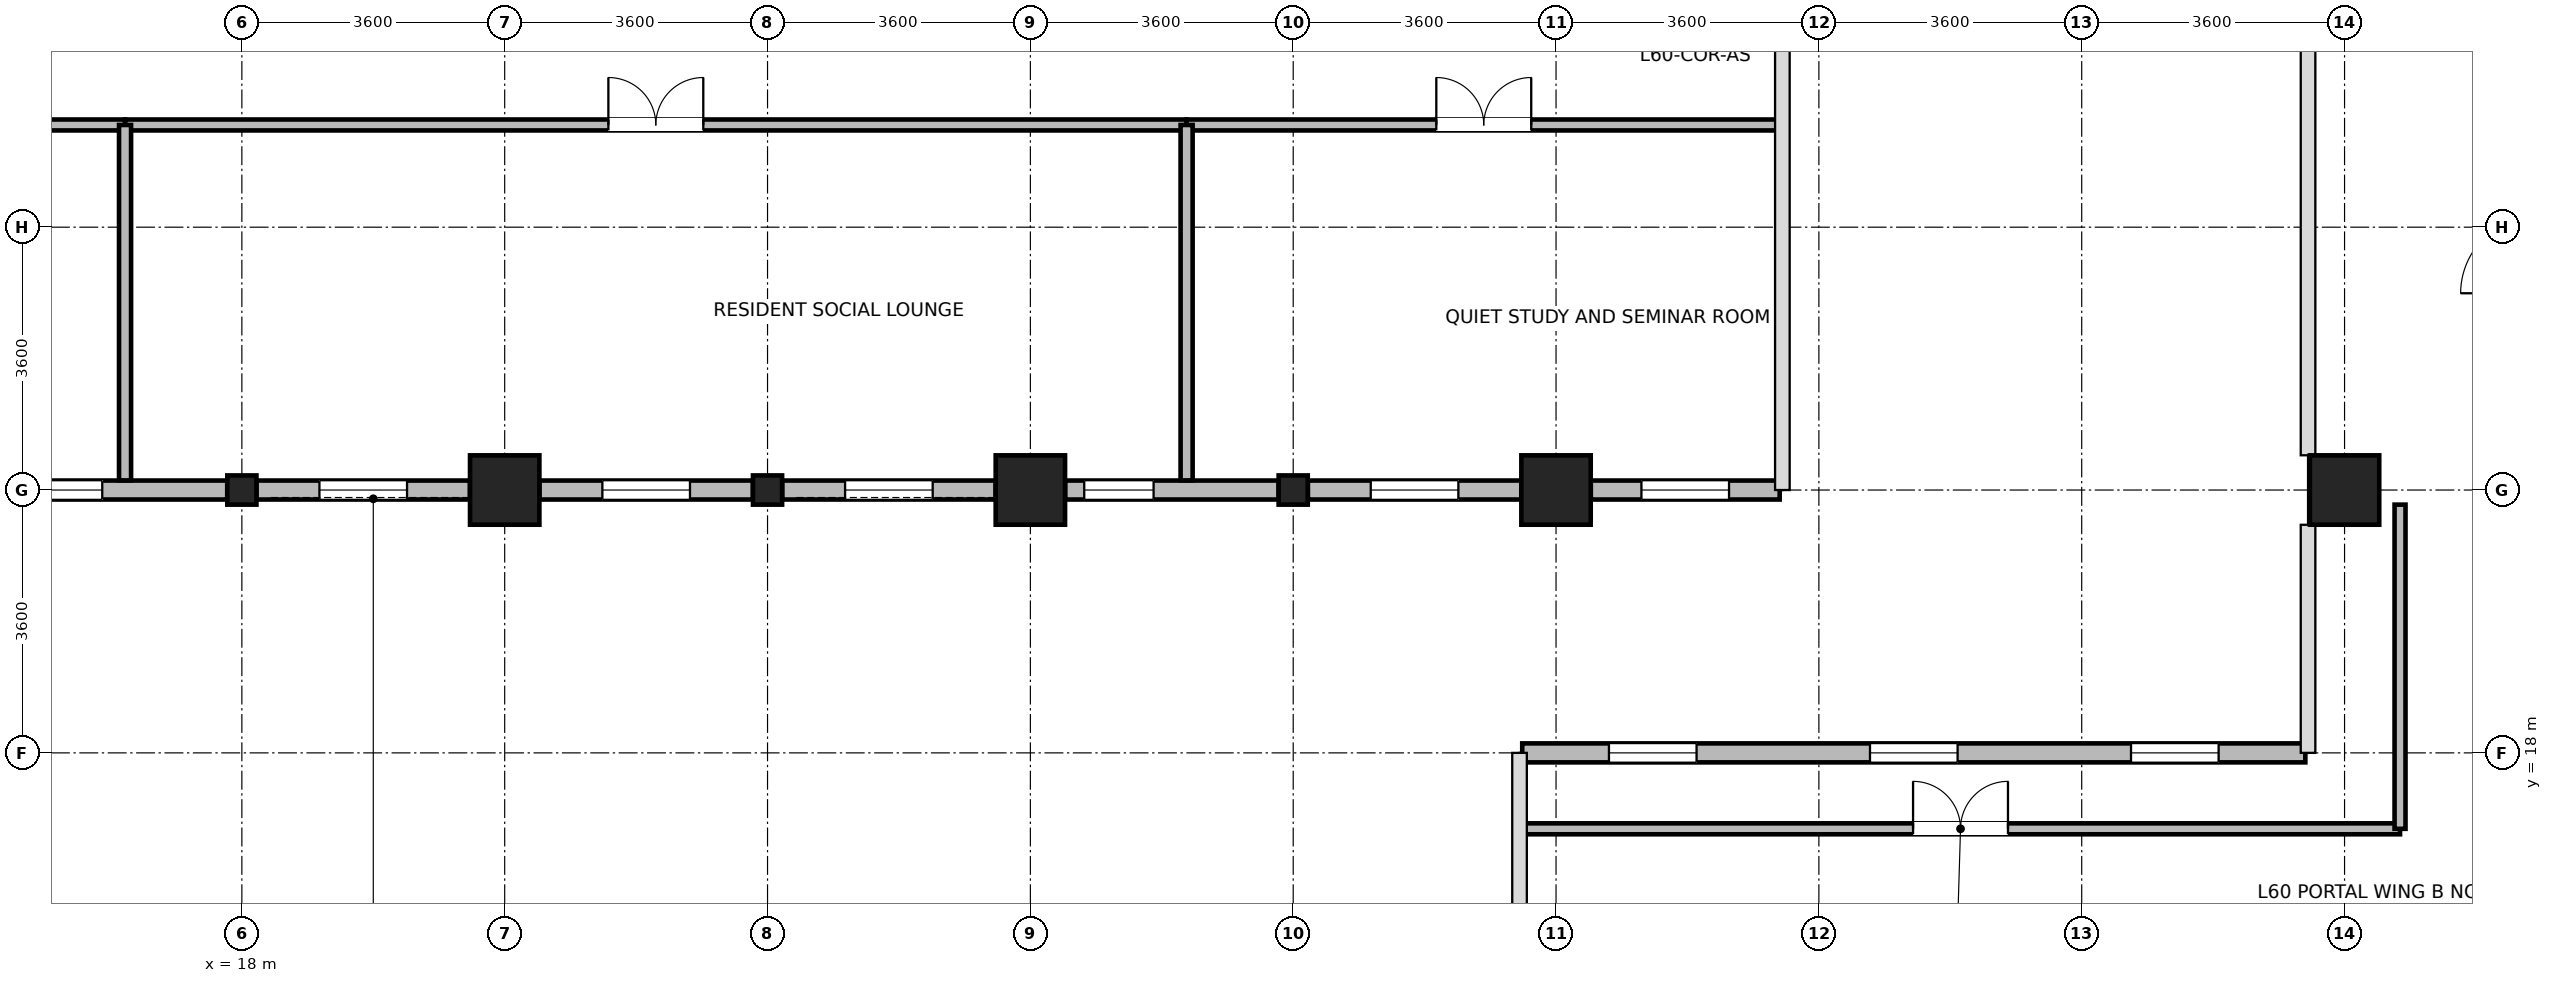
"""IFC4 building model, lengths in metres.
Left out: names, types, materials, properties, quantities, classifications, styles, units other than length and angle.
Written with IfcOpenShell. Run it as: python <this file> out.ifc"""

import sys

from ifc_helpers import new_model, si_unit, direction, frame, frame_2d, origin, origin_2d, place, context, subcontext, project, spatial, rectangle, i_section, extrude, source, transform, mapped, element, fill, save


model = new_model("IFC4")
c1 = context("Model", 3, precision=1e-05, world=origin(), true_north=direction((0.0, 1.0)))
c2 = subcontext(c1, "Body", "Model", "MODEL_VIEW")
j1 = project(units=[si_unit("LENGTHUNIT", "METRE"), si_unit("PLANEANGLEUNIT", "RADIAN")], contexts=[c1])
p1 = place(None, origin())
s1 = spatial("IfcSite", under=j1, at=p1, CompositionType="ELEMENT")
p2 = place(p1, origin())
s2 = spatial("IfcBuilding", under=s1, at=p2, CompositionType="ELEMENT")
p3 = place(p2, frame((0.0, 0.0, 235.1)))
s3 = spatial("IfcBuildingStorey", under=s2, at=p3, CompositionType="ELEMENT", Elevation=235.1)
m1 = source(origin(), c2, "Body", "SweptSolid", [
    extrude(rectangle(XDim=0.95, YDim=0.95, at=origin_2d()), origin(), (0.0, 0.0, 1.0), 3.7),
])
for number, where, z_axis, x_axis in (
    (1, (21.6, 21.6, 0.0), (0.0, 0.0, 1.0), (1.0, 0.0, 0.0)),
    (2, (28.8, 21.6, 0.0), (0.0, 0.0, 1.0), (1.0, 0.0, 0.0)),
    (3, (36.0, 21.6, 0.0), (0.0, 0.0, 1.0), (1.0, 0.0, 0.0)),
    (4, (46.8, 21.6, 0.0), (0.0, 0.0, 1.0), (1.0, 0.0, 0.0)),
):
    element("IfcColumn", number, at=place(p3, frame(where, z_axis=z_axis, x_axis=x_axis)), inside=s3, PredefinedType="COLUMN", context=c2, shape_type="MappedRepresentation", body=[
        mapped(m1, transform((0.0, 0.0, 0.0), x_axis=(1.0, 0.0, 0.0), y_axis=(0.0, 1.0, 0.0), z_axis=(0.0, 0.0, 1.0), scale=1.0)),
    ])
m2 = source(origin(), c2, "Body", "SweptSolid", [
    extrude(i_section(OverallWidth=0.399, OverallDepth=0.4, WebThickness=0.017, FlangeThickness=0.023, FilletRadius=0.015, at=origin_2d()), origin(), (0.0, 0.0, 1.0), 3.7),
])
for number, where, z_axis, x_axis in (
    (5, (18.0, 21.6, 0.0), (0.0, 0.0, 1.0), (1.0, 0.0, 0.0)),
    (6, (25.2, 21.6, 0.0), (0.0, 0.0, 1.0), (1.0, 0.0, 0.0)),
    (7, (32.4, 21.6, 0.0), (0.0, 0.0, 1.0), (1.0, 0.0, 0.0)),
):
    element("IfcColumn", number, at=place(p3, frame(where, z_axis=z_axis, x_axis=x_axis)), inside=s3, PredefinedType="COLUMN", context=c2, shape_type="MappedRepresentation", body=[
        mapped(m2, transform((0.0, 0.0, 0.0), x_axis=(1.0, 0.0, 0.0), y_axis=(0.0, 1.0, 0.0), z_axis=(0.0, 0.0, 1.0), scale=1.0)),
    ])
p4 = place(p3, frame((17.8, 21.6, 0.0), z_axis=(0.0, 0.0, 1.0), x_axis=(-1.0, 0.0, 0.0)))
e8 = element("IfcWall", 8, at=p4, inside=s3, PredefinedType="STANDARD", context=c2, shape_type="SweptSolid", body=[
    extrude(rectangle(XDim=2.924, YDim=0.26, at=frame_2d((1.462, 0.0))), origin(), (0.0, 0.0, 1.0), 3.02),
])
p5 = place(p4, frame((1.712, 0.0, 0.85)))
e9 = element("IfcOpeningElement", 9, at=p5, cuts=e8, PredefinedType="OPENING", context=c2, shape_type="SweptSolid", body=[
    extrude(rectangle(XDim=0.95, YDim=1.75, at=frame_2d((0.475, 0.875))), frame((0.0, 0.14, 0.0), z_axis=(0.0, -1.0, 0.0), x_axis=(1.0, 0.0, 0.0)), (0.0, 0.0, 1.0), 0.28),
])
p6 = place(p3, frame((21.124, 21.6, 0.0), z_axis=(0.0, 0.0, 1.0), x_axis=(-1.0, 0.0, 0.0)))
e10 = element("IfcWall", 10, at=p6, inside=s3, PredefinedType="STANDARD", context=c2, shape_type="SweptSolid", body=[
    extrude(rectangle(XDim=2.924, YDim=0.26, at=frame_2d((1.462, 0.0))), origin(), (0.0, 0.0, 1.0), 3.02),
])
p7 = place(p6, frame((0.862, 0.0, 0.85)))
e11 = element("IfcOpeningElement", 11, at=p7, cuts=e10, PredefinedType="OPENING", context=c2, shape_type="SweptSolid", body=[
    extrude(rectangle(XDim=1.2, YDim=1.75, at=frame_2d((0.6, 0.875))), frame((0.0, 0.14, 0.0), z_axis=(0.0, -1.0, 0.0), x_axis=(1.0, 0.0, 0.0)), (0.0, 0.0, 1.0), 0.28),
])
p8 = place(p3, frame((25.0, 21.6, 0.0), z_axis=(0.0, 0.0, 1.0), x_axis=(-1.0, 0.0, 0.0)))
e12 = element("IfcWall", 12, at=p8, inside=s3, PredefinedType="STANDARD", context=c2, shape_type="SweptSolid", body=[
    extrude(rectangle(XDim=2.924, YDim=0.26, at=frame_2d((1.462, 0.0))), origin(), (0.0, 0.0, 1.0), 3.02),
])
p9 = place(p8, frame((0.862, 0.0, 0.85)))
e13 = element("IfcOpeningElement", 13, at=p9, cuts=e12, PredefinedType="OPENING", context=c2, shape_type="SweptSolid", body=[
    extrude(rectangle(XDim=1.2, YDim=1.75, at=frame_2d((0.6, 0.875))), frame((0.0, 0.14, 0.0), z_axis=(0.0, -1.0, 0.0), x_axis=(1.0, 0.0, 0.0)), (0.0, 0.0, 1.0), 0.28),
])
p10 = place(p3, frame((28.324, 21.6, 0.0), z_axis=(0.0, 0.0, 1.0), x_axis=(-1.0, 0.0, 0.0)))
e14 = element("IfcWall", 14, at=p10, inside=s3, PredefinedType="STANDARD", context=c2, shape_type="SweptSolid", body=[
    extrude(rectangle(XDim=2.924, YDim=0.26, at=frame_2d((1.462, 0.0))), origin(), (0.0, 0.0, 1.0), 3.02),
])
p11 = place(p10, frame((0.862, 0.0, 0.85)))
e15 = element("IfcOpeningElement", 15, at=p11, cuts=e14, PredefinedType="OPENING", context=c2, shape_type="SweptSolid", body=[
    extrude(rectangle(XDim=1.2, YDim=1.75, at=frame_2d((0.6, 0.875))), frame((0.0, 0.14, 0.0), z_axis=(0.0, -1.0, 0.0), x_axis=(1.0, 0.0, 0.0)), (0.0, 0.0, 1.0), 0.28),
])
p12 = place(p3, frame((32.199, 21.6, 0.0), z_axis=(0.0, 0.0, 1.0), x_axis=(-1.0, 0.0, 0.0)))
e16 = element("IfcWall", 16, at=p12, inside=s3, PredefinedType="STANDARD", context=c2, shape_type="SweptSolid", body=[
    extrude(rectangle(XDim=2.924, YDim=0.26, at=frame_2d((1.462, 0.0))), origin(), (0.0, 0.0, 1.0), 3.02),
])
p13 = place(p12, frame((1.712, 0.0, 0.85)))
e17 = element("IfcOpeningElement", 17, at=p13, cuts=e16, PredefinedType="OPENING", context=c2, shape_type="SweptSolid", body=[
    extrude(rectangle(XDim=0.95, YDim=1.75, at=frame_2d((0.475, 0.875))), frame((0.0, 0.14, 0.0), z_axis=(0.0, -1.0, 0.0), x_axis=(1.0, 0.0, 0.0)), (0.0, 0.0, 1.0), 0.28),
])
p14 = place(p3, frame((35.524, 21.6, 0.0), z_axis=(0.0, 0.0, 1.0), x_axis=(-1.0, 0.0, 0.0)))
e18 = element("IfcWall", 18, at=p14, inside=s3, PredefinedType="STANDARD", context=c2, shape_type="SweptSolid", body=[
    extrude(rectangle(XDim=2.923, YDim=0.26, at=frame_2d((1.462, 0.0))), origin(), (0.0, 0.0, 1.0), 3.02),
])
p15 = place(p14, frame((0.862, 0.0, 0.85)))
e19 = element("IfcOpeningElement", 19, at=p15, cuts=e18, PredefinedType="OPENING", context=c2, shape_type="SweptSolid", body=[
    extrude(rectangle(XDim=1.2, YDim=1.75, at=frame_2d((0.6, 0.875))), frame((0.0, 0.14, 0.0), z_axis=(0.0, -1.0, 0.0), x_axis=(1.0, 0.0, 0.0)), (0.0, 0.0, 1.0), 0.28),
])
p16 = place(p3, frame((39.063, 21.6, 0.0), z_axis=(0.0, 0.0, 1.0), x_axis=(-1.0, 0.0, 0.0)))
e20 = element("IfcWall", 20, at=p16, inside=s3, PredefinedType="STANDARD", context=c2, shape_type="SweptSolid", body=[
    extrude(rectangle(XDim=2.587, YDim=0.26, at=frame_2d((1.293, 0.0))), origin(), (0.0, 0.0, 1.0), 3.42),
])
p17 = place(p16, frame((0.694, 0.0, 0.85)))
e21 = element("IfcOpeningElement", 21, at=p17, cuts=e20, PredefinedType="OPENING", context=c2, shape_type="SweptSolid", body=[
    extrude(rectangle(XDim=1.2, YDim=1.75, at=frame_2d((0.6, 0.875))), frame((0.0, 0.14, 0.0), z_axis=(0.0, -1.0, 0.0), x_axis=(1.0, 0.0, 0.0)), (0.0, 0.0, 1.0), 0.28),
])
p18 = place(p3, frame((35.537, 18.0, 0.0), z_axis=(0.0, 0.0, 1.0), x_axis=(1.0, 0.0, 0.0)))
e22 = element("IfcWall", 22, at=p18, inside=s3, PredefinedType="STANDARD", context=c2, shape_type="SweptSolid", body=[
    extrude(rectangle(XDim=10.726, YDim=0.26, at=frame_2d((5.363, 0.0))), origin(), (0.0, 0.0, 1.0), 3.42),
])
p19 = place(p18, frame((1.188, 0.0, 0.85)))
e23 = element("IfcOpeningElement", 23, at=p19, cuts=e22, PredefinedType="OPENING", context=c2, shape_type="SweptSolid", body=[
    extrude(rectangle(XDim=1.2, YDim=1.75, at=frame_2d((0.6, 0.875))), frame((0.0, 0.14, 0.0), z_axis=(0.0, -1.0, 0.0), x_axis=(1.0, 0.0, 0.0)), (0.0, 0.0, 1.0), 0.28),
])
p20 = place(p18, frame((4.763, 0.0, 0.85)))
e24 = element("IfcOpeningElement", 24, at=p20, cuts=e22, PredefinedType="OPENING", context=c2, shape_type="SweptSolid", body=[
    extrude(rectangle(XDim=1.2, YDim=1.75, at=frame_2d((0.6, 0.875))), frame((0.0, 0.14, 0.0), z_axis=(0.0, -1.0, 0.0), x_axis=(1.0, 0.0, 0.0)), (0.0, 0.0, 1.0), 0.28),
])
p21 = place(p18, frame((8.338, 0.0, 0.85)))
e25 = element("IfcOpeningElement", 25, at=p21, cuts=e22, PredefinedType="OPENING", context=c2, shape_type="SweptSolid", body=[
    extrude(rectangle(XDim=1.2, YDim=1.75, at=frame_2d((0.6, 0.875))), frame((0.0, 0.14, 0.0), z_axis=(0.0, -1.0, 0.0), x_axis=(1.0, 0.0, 0.0)), (0.0, 0.0, 1.0), 0.28),
])
p22 = place(p3, frame((16.4, 26.6, 0.0), z_axis=(0.0, 0.0, 1.0), x_axis=(1.0, 0.0, 0.0)))
e26 = element("IfcWall", 26, at=p22, inside=s3, PredefinedType="PARTITIONING", context=c2, shape_type="SweptSolid", body=[
    extrude(rectangle(XDim=14.54, YDim=0.15, at=frame_2d((7.27, 0.0))), origin(), (0.0, 0.0, 1.0), 3.42),
])
p23 = place(p22, frame((6.62, 0.0, 0.0)))
e27 = element("IfcOpeningElement", 27, at=p23, cuts=e26, PredefinedType="OPENING", context=c2, shape_type="SweptSolid", body=[
    extrude(rectangle(XDim=1.3, YDim=2.12, at=frame_2d((0.65, 1.06))), frame((0.0, 0.085, 0.0), z_axis=(0.0, -1.0, 0.0), x_axis=(1.0, 0.0, 0.0)), (0.0, 0.0, 1.0), 0.17),
])
p24 = place(p3, frame((35.52, 16.96, 0.0), z_axis=(0.0, 0.0, 1.0), x_axis=(1.0, 0.0, 0.0)))
e28 = element("IfcWall", 28, at=p24, inside=s3, PredefinedType="PARTITIONING", context=c2, shape_type="SweptSolid", body=[
    extrude(rectangle(XDim=12.04, YDim=0.15, at=frame_2d((6.02, 0.0))), origin(), (0.0, 0.0, 1.0), 3.42),
])
p25 = place(p24, frame((5.37, 0.0, 0.0)))
e29 = element("IfcOpeningElement", 29, at=p25, cuts=e28, PredefinedType="OPENING", context=c2, shape_type="SweptSolid", body=[
    extrude(rectangle(XDim=1.3, YDim=2.12, at=frame_2d((0.65, 1.06))), frame((0.0, 0.085, 0.0), z_axis=(0.0, -1.0, 0.0), x_axis=(1.0, 0.0, 0.0)), (0.0, 0.0, 1.0), 0.17),
])
p26 = place(p3, frame((6.832, 26.6, 0.0), z_axis=(0.0, 0.0, 1.0), x_axis=(1.0, 0.0, 0.0)))
e30 = element("IfcWall", 30, at=p26, inside=s3, PredefinedType="PARTITIONING", context=c2, shape_type="SweptSolid", body=[
    extrude(rectangle(XDim=9.568, YDim=0.15, at=frame_2d((4.784, 0.0))), origin(), (0.0, 0.0, 1.0), 3.42),
])
p27 = place(p26, frame((4.309, 0.0, 0.0)))
e31 = element("IfcOpeningElement", 31, at=p27, cuts=e30, PredefinedType="OPENING", context=c2, shape_type="SweptSolid", body=[
    extrude(rectangle(XDim=0.95, YDim=2.1, at=frame_2d((0.475, 1.05))), frame((0.0, 0.085, 0.0), z_axis=(0.0, -1.0, 0.0), x_axis=(1.0, 0.0, 0.0)), (0.0, 0.0, 1.0), 0.17),
])
p28 = place(p3, frame((30.94, 26.6, 0.0), z_axis=(0.0, 0.0, 1.0), x_axis=(1.0, 0.0, 0.0)))
e32 = element("IfcWall", 32, at=p28, inside=s3, PredefinedType="PARTITIONING", context=c2, shape_type="SweptSolid", body=[
    extrude(rectangle(XDim=8.14, YDim=0.15, at=frame_2d((4.07, 0.0))), origin(), (0.0, 0.0, 1.0), 3.42),
])
p29 = place(p28, frame((3.42, 0.0, 0.0)))
e33 = element("IfcOpeningElement", 33, at=p29, cuts=e32, PredefinedType="OPENING", context=c2, shape_type="SweptSolid", body=[
    extrude(rectangle(XDim=1.3, YDim=2.12, at=frame_2d((0.65, 1.06))), frame((0.0, 0.085, 0.0), z_axis=(0.0, -1.0, 0.0), x_axis=(1.0, 0.0, 0.0)), (0.0, 0.0, 1.0), 0.17),
])
p30 = place(p3, frame((47.56, 16.96, 0.0), z_axis=(0.0, 0.0, 1.0), x_axis=(0.0, 1.0, 0.0)))
e34 = element("IfcWall", 34, at=p30, inside=s3, PredefinedType="PARTITIONING", context=c2, shape_type="SweptSolid", body=[
    extrude(rectangle(XDim=4.44, YDim=0.15, at=frame_2d((2.22, 0.0))), origin(), (0.0, 0.0, 1.0), 3.42),
])
for number, where, z_axis, x_axis in (
    (35, (16.4, 21.732, 0.0), (0.0, 0.0, 1.0), (0.0, 1.0, 0.0)),
    (36, (30.94, 21.732, 0.0), (0.0, 0.0, 1.0), (0.0, 1.0, 0.0)),
):
    element("IfcWall", number, at=place(p3, frame(where, z_axis=z_axis, x_axis=x_axis)), inside=s3, PredefinedType="PARTITIONING", context=c2, shape_type="SweptSolid", body=[
        extrude(rectangle(XDim=4.868, YDim=0.165, at=frame_2d((2.434, 0.0))), origin(), (0.0, 0.0, 1.0), 3.42),
    ])
p31 = place(p5, origin())
e37 = element("IfcWindow", 37, at=p31, inside=s3, PartitioningType="SINGLE_PANEL", PredefinedType="WINDOW", context=c2, shape_type="SweptSolid", body=[
    extrude(rectangle(XDim=0.95, YDim=1.75, at=frame_2d((0.475, 0.875))), frame((0.0, 0.03, 0.0), z_axis=(0.0, -1.0, 0.0), x_axis=(1.0, 0.0, 0.0)), (0.0, 0.0, 1.0), 0.06),
])
fill(e9, e37)
p32 = place(p7, origin())
e38 = element("IfcWindow", 38, at=p32, inside=s3, PartitioningType="SINGLE_PANEL", PredefinedType="WINDOW", context=c2, shape_type="SweptSolid", body=[
    extrude(rectangle(XDim=1.2, YDim=1.75, at=frame_2d((0.6, 0.875))), frame((0.0, 0.03, 0.0), z_axis=(0.0, -1.0, 0.0), x_axis=(1.0, 0.0, 0.0)), (0.0, 0.0, 1.0), 0.06),
])
fill(e11, e38)
p33 = place(p9, origin())
e39 = element("IfcWindow", 39, at=p33, inside=s3, PartitioningType="SINGLE_PANEL", PredefinedType="WINDOW", context=c2, shape_type="SweptSolid", body=[
    extrude(rectangle(XDim=1.2, YDim=1.75, at=frame_2d((0.6, 0.875))), frame((0.0, 0.03, 0.0), z_axis=(0.0, -1.0, 0.0), x_axis=(1.0, 0.0, 0.0)), (0.0, 0.0, 1.0), 0.06),
])
fill(e13, e39)
p34 = place(p11, origin())
e40 = element("IfcWindow", 40, at=p34, inside=s3, PartitioningType="SINGLE_PANEL", PredefinedType="WINDOW", context=c2, shape_type="SweptSolid", body=[
    extrude(rectangle(XDim=1.2, YDim=1.75, at=frame_2d((0.6, 0.875))), frame((0.0, 0.03, 0.0), z_axis=(0.0, -1.0, 0.0), x_axis=(1.0, 0.0, 0.0)), (0.0, 0.0, 1.0), 0.06),
])
fill(e15, e40)
p35 = place(p13, origin())
e41 = element("IfcWindow", 41, at=p35, inside=s3, PartitioningType="SINGLE_PANEL", PredefinedType="WINDOW", context=c2, shape_type="SweptSolid", body=[
    extrude(rectangle(XDim=0.95, YDim=1.75, at=frame_2d((0.475, 0.875))), frame((0.0, 0.03, 0.0), z_axis=(0.0, -1.0, 0.0), x_axis=(1.0, 0.0, 0.0)), (0.0, 0.0, 1.0), 0.06),
])
fill(e17, e41)
p36 = place(p15, origin())
e42 = element("IfcWindow", 42, at=p36, inside=s3, PartitioningType="SINGLE_PANEL", PredefinedType="WINDOW", context=c2, shape_type="SweptSolid", body=[
    extrude(rectangle(XDim=1.2, YDim=1.75, at=frame_2d((0.6, 0.875))), frame((0.0, 0.03, 0.0), z_axis=(0.0, -1.0, 0.0), x_axis=(1.0, 0.0, 0.0)), (0.0, 0.0, 1.0), 0.06),
])
fill(e19, e42)
p37 = place(p17, origin())
e43 = element("IfcWindow", 43, at=p37, inside=s3, PartitioningType="SINGLE_PANEL", PredefinedType="WINDOW", context=c2, shape_type="SweptSolid", body=[
    extrude(rectangle(XDim=1.2, YDim=1.75, at=frame_2d((0.6, 0.875))), frame((0.0, 0.03, 0.0), z_axis=(0.0, -1.0, 0.0), x_axis=(1.0, 0.0, 0.0)), (0.0, 0.0, 1.0), 0.06),
])
fill(e21, e43)
p38 = place(p19, origin())
e44 = element("IfcWindow", 44, at=p38, inside=s3, PartitioningType="SINGLE_PANEL", PredefinedType="WINDOW", context=c2, shape_type="SweptSolid", body=[
    extrude(rectangle(XDim=1.2, YDim=1.75, at=frame_2d((0.6, 0.875))), frame((0.0, 0.03, 0.0), z_axis=(0.0, -1.0, 0.0), x_axis=(1.0, 0.0, 0.0)), (0.0, 0.0, 1.0), 0.06),
])
fill(e23, e44)
p39 = place(p20, origin())
e45 = element("IfcWindow", 45, at=p39, inside=s3, PartitioningType="SINGLE_PANEL", PredefinedType="WINDOW", context=c2, shape_type="SweptSolid", body=[
    extrude(rectangle(XDim=1.2, YDim=1.75, at=frame_2d((0.6, 0.875))), frame((0.0, 0.03, 0.0), z_axis=(0.0, -1.0, 0.0), x_axis=(1.0, 0.0, 0.0)), (0.0, 0.0, 1.0), 0.06),
])
fill(e24, e45)
p40 = place(p21, origin())
e46 = element("IfcWindow", 46, at=p40, inside=s3, PartitioningType="SINGLE_PANEL", PredefinedType="WINDOW", context=c2, shape_type="SweptSolid", body=[
    extrude(rectangle(XDim=1.2, YDim=1.75, at=frame_2d((0.6, 0.875))), frame((0.0, 0.03, 0.0), z_axis=(0.0, -1.0, 0.0), x_axis=(1.0, 0.0, 0.0)), (0.0, 0.0, 1.0), 0.06),
])
fill(e25, e46)
p41 = place(p23, origin())
e47 = element("IfcDoor", 47, at=p41, inside=s3, OperationType="DOUBLE_DOOR_SINGLE_SWING", PredefinedType="DOOR", context=c2, shape_type="SweptSolid", body=[
    extrude(rectangle(XDim=1.3, YDim=2.12, at=frame_2d((0.65, 1.06))), frame((0.0, 0.025, 0.0), z_axis=(0.0, -1.0, 0.0), x_axis=(1.0, 0.0, 0.0)), (0.0, 0.0, 1.0), 0.05),
])
fill(e27, e47)
p42 = place(p25, origin())
e48 = element("IfcDoor", 48, at=p42, inside=s3, OperationType="DOUBLE_DOOR_SINGLE_SWING", PredefinedType="DOOR", context=c2, shape_type="SweptSolid", body=[
    extrude(rectangle(XDim=1.3, YDim=2.12, at=frame_2d((0.65, 1.06))), frame((0.0, 0.025, 0.0), z_axis=(0.0, -1.0, 0.0), x_axis=(1.0, 0.0, 0.0)), (0.0, 0.0, 1.0), 0.05),
])
fill(e29, e48)
p43 = place(p29, origin())
e49 = element("IfcDoor", 49, at=p43, inside=s3, OperationType="DOUBLE_DOOR_SINGLE_SWING", PredefinedType="DOOR", context=c2, shape_type="SweptSolid", body=[
    extrude(rectangle(XDim=1.3, YDim=2.12, at=frame_2d((0.65, 1.06))), frame((0.0, 0.025, 0.0), z_axis=(0.0, -1.0, 0.0), x_axis=(1.0, 0.0, 0.0)), (0.0, 0.0, 1.0), 0.05),
])
fill(e33, e49)
save(model, sys.argv[1])
